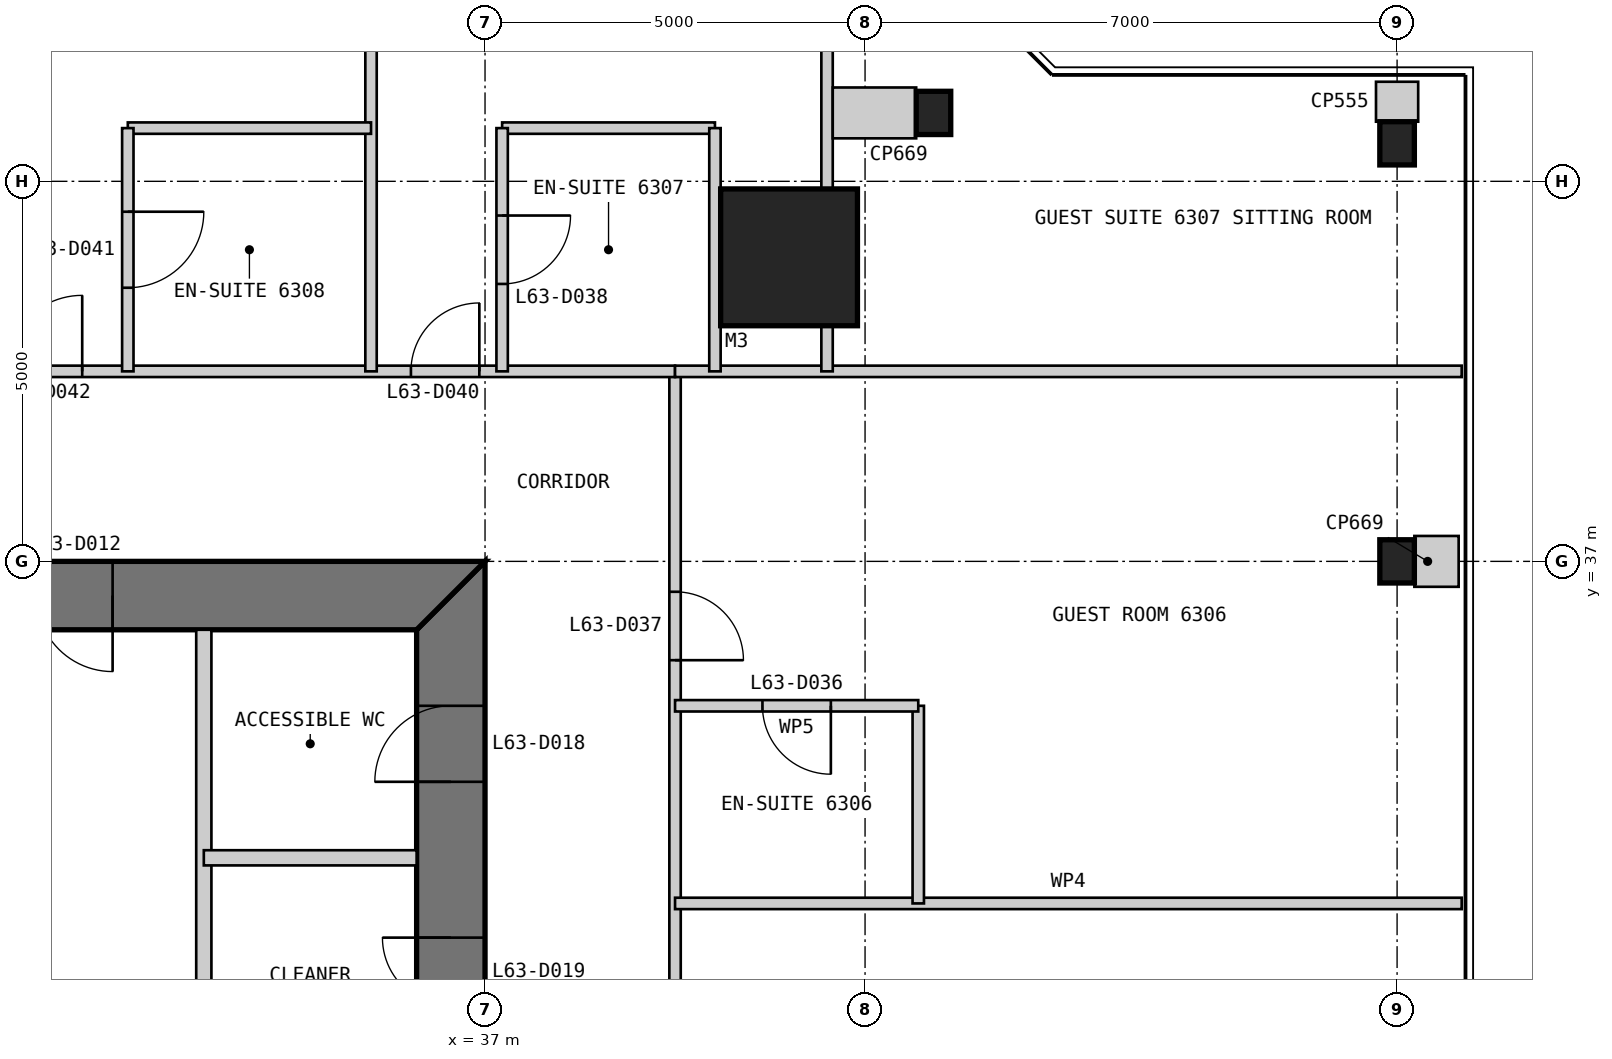
"""IFC4 building model, lengths in metres.
Left out: names, types, materials, properties, quantities, classifications, styles, units other than length and angle.
Written with IfcOpenShell. Run it as: python <this file> out.ifc"""

import sys

from ifc_helpers import new_model, si_unit, direction, frame, frame_2d, origin, origin_2d, place, context, subcontext, project, spatial, polyline, rectangle, i_section, outline, extrude, element, fill, save


model = new_model("IFC4")
c1 = context("Model", 3, precision=1e-05, world=origin(), true_north=direction((0.0, 1.0)))
c2 = subcontext(c1, "Body", "Model", "MODEL_VIEW")
j1 = project(units=[si_unit("LENGTHUNIT", "METRE"), si_unit("PLANEANGLEUNIT", "RADIAN")], contexts=[c1])
p1 = place(None, origin())
s1 = spatial("IfcSite", under=j1, at=p1, CompositionType="ELEMENT")
p2 = place(p1, origin())
s2 = spatial("IfcBuilding", under=s1, at=p2, CompositionType="ELEMENT")
p3 = place(p2, frame((0.0, 0.0, 266.2)))
s3 = spatial("IfcBuildingStorey", under=s2, at=p3, CompositionType="ELEMENT", Elevation=266.2)
p4 = place(p3, frame((41.0, 41.0, 0.0), z_axis=(0.0, 0.0, 1.0), x_axis=(1.0, 0.0, 0.0)))
e1 = element("IfcColumn", 1, at=p4, inside=s3, PredefinedType="COLUMN", context=c2, shape_type="SweptSolid", body=[
    extrude(rectangle(XDim=1.8, YDim=1.8, at=origin_2d()), origin(), (0.0, 0.0, 1.0), 3.4),
])
for number, where, z_axis, x_axis in (
    (2, (49.0, 37.0, 0.0), (0.0, 0.0, 1.0), (1.0, 0.0, 0.0)),
    (3, (49.0, 42.5, 0.0), (0.0, 0.0, 1.0), (1.0, 0.0, 0.0)),
    (4, (42.9, 42.9, 0.0), (0.0, 0.0, 1.0), (1.0, 0.0, 0.0)),
):
    element("IfcColumn", number, at=place(p3, frame(where, z_axis=z_axis, x_axis=x_axis)), inside=s3, PredefinedType="COLUMN", context=c2, shape_type="SweptSolid", body=[
        extrude(i_section(OverallWidth=0.455, OverallDepth=0.569, WebThickness=0.078, FlangeThickness=0.125, at=origin_2d()), origin(), (0.0, 0.0, 1.0), 3.4),
    ])
p5 = place(p3, frame((36.55, 13.9, 0.0), z_axis=(0.0, 0.0, 1.0), x_axis=(0.0, 1.0, 0.0)))
e5 = element("IfcWall", 5, at=p5, inside=s3, PredefinedType="SHEAR", context=c2, shape_type="SweptSolid", body=[
    extrude(outline(polyline([(-0.9, -0.45), (23.1, -0.45), (22.2, 0.45), (0.0, 0.45), (-0.9, -0.45)])), origin(), (0.0, 0.0, 1.0), 3.4),
])
p6 = place(p5, frame((20.2, 0.0, 0.0)))
e6 = element("IfcOpeningElement", 6, at=p6, cuts=e5, PredefinedType="OPENING", context=c2, shape_type="SweptSolid", body=[
    extrude(rectangle(XDim=1.0, YDim=2.2, at=frame_2d((0.5, 1.1))), frame((0.0, 0.46, 0.0), z_axis=(0.0, -1.0, 0.0), x_axis=(1.0, 0.0, 0.0)), (0.0, 0.0, 1.0), 0.92),
])
p7 = place(p5, frame((17.25, 0.0, 0.0)))
e7 = element("IfcOpeningElement", 7, at=p7, cuts=e5, PredefinedType="OPENING", context=c2, shape_type="SweptSolid", body=[
    extrude(rectangle(XDim=0.9, YDim=2.2, at=frame_2d((0.45, 1.1))), frame((0.0, 0.46, 0.0), z_axis=(0.0, -1.0, 0.0), x_axis=(1.0, 0.0, 0.0)), (0.0, 0.0, 1.0), 0.92),
])
p8 = place(p3, frame((37.0, 36.55, 0.0), z_axis=(0.0, 0.0, 1.0), x_axis=(-1.0, 0.0, 0.0)))
e8 = element("IfcWall", 8, at=p8, inside=s3, PredefinedType="SHEAR", context=c2, shape_type="SweptSolid", body=[
    extrude(outline(polyline([(0.0, -0.45), (24.0, -0.45), (23.1, 0.45), (0.9, 0.45), (0.0, -0.45)])), origin(), (0.0, 0.0, 1.0), 3.4),
])
p9 = place(p8, frame((4.9, 0.0, 0.0)))
e9 = element("IfcOpeningElement", 9, at=p9, cuts=e8, PredefinedType="OPENING", context=c2, shape_type="SweptSolid", body=[
    extrude(rectangle(XDim=1.0, YDim=2.2, at=frame_2d((0.5, 1.1))), frame((0.0, 0.46, 0.0), z_axis=(0.0, -1.0, 0.0), x_axis=(1.0, 0.0, 0.0)), (0.0, 0.0, 1.0), 0.92),
])
p10 = place(p8, frame((8.9, 0.0, 0.0)))
e10 = element("IfcOpeningElement", 10, at=p10, cuts=e8, PredefinedType="OPENING", context=c2, shape_type="SweptSolid", body=[
    extrude(rectangle(XDim=1.1, YDim=2.2, at=frame_2d((0.55, 1.1))), frame((0.0, 0.46, 0.0), z_axis=(0.0, -1.0, 0.0), x_axis=(1.0, 0.0, 0.0)), (0.0, 0.0, 1.0), 0.92),
])
p11 = place(p8, frame((15.05, 0.0, 0.0)))
e11 = element("IfcOpeningElement", 11, at=p11, cuts=e8, PredefinedType="OPENING", context=c2, shape_type="SweptSolid", body=[
    extrude(rectangle(XDim=0.9, YDim=2.2, at=frame_2d((0.45, 1.1))), frame((0.0, 0.46, 0.0), z_axis=(0.0, -1.0, 0.0), x_axis=(1.0, 0.0, 0.0)), (0.0, 0.0, 1.0), 0.92),
])
p12 = place(p8, frame((17.9, 0.0, 0.0)))
e12 = element("IfcOpeningElement", 12, at=p12, cuts=e8, PredefinedType="OPENING", context=c2, shape_type="SweptSolid", body=[
    extrude(rectangle(XDim=1.0, YDim=2.2, at=frame_2d((0.5, 1.1))), frame((0.0, 0.46, 0.0), z_axis=(0.0, -1.0, 0.0), x_axis=(1.0, 0.0, 0.0)), (0.0, 0.0, 1.0), 0.92),
])
p13 = place(p8, frame((21.4, 0.0, 0.0)))
e13 = element("IfcOpeningElement", 13, at=p13, cuts=e8, PredefinedType="OPENING", context=c2, shape_type="SweptSolid", body=[
    extrude(rectangle(XDim=1.0, YDim=2.2, at=frame_2d((0.5, 1.1))), frame((0.0, 0.46, 0.0), z_axis=(0.0, -1.0, 0.0), x_axis=(1.0, 0.0, 0.0)), (0.0, 0.0, 1.0), 0.92),
])
p14 = place(p3, frame((33.3, 36.1, 0.0), z_axis=(0.0, 0.0, 1.0), x_axis=(0.0, -1.0, 0.0)))
e14 = element("IfcWall", 14, at=p14, inside=s3, PredefinedType="PARTITIONING", context=c2, shape_type="SweptSolid", body=[
    extrude(rectangle(XDim=16.1, YDim=0.2, at=frame_2d((8.05, 0.0))), origin(), (0.0, 0.0, 1.0), 3.2),
])
p15 = place(p14, frame((7.217, 0.0, 0.0)))
e15 = element("IfcOpeningElement", 15, at=p15, cuts=e14, PredefinedType="OPENING", context=c2, shape_type="SweptSolid", body=[
    extrude(rectangle(XDim=1.1, YDim=2.2, at=frame_2d((0.55, 1.1))), frame((0.0, 0.11, 0.0), z_axis=(0.0, -1.0, 0.0), x_axis=(1.0, 0.0, 0.0)), (0.0, 0.0, 1.0), 0.22),
])
p16 = place(p14, frame((10.55, 0.0, 0.0)))
e16 = element("IfcOpeningElement", 16, at=p16, cuts=e14, PredefinedType="OPENING", context=c2, shape_type="SweptSolid", body=[
    extrude(rectangle(XDim=1.1, YDim=2.2, at=frame_2d((0.55, 1.1))), frame((0.0, 0.11, 0.0), z_axis=(0.0, -1.0, 0.0), x_axis=(1.0, 0.0, 0.0)), (0.0, 0.0, 1.0), 0.22),
])
p17 = place(p14, frame((13.883, 0.0, 0.0)))
e17 = element("IfcOpeningElement", 17, at=p17, cuts=e14, PredefinedType="OPENING", context=c2, shape_type="SweptSolid", body=[
    extrude(rectangle(XDim=1.1, YDim=2.2, at=frame_2d((0.55, 1.1))), frame((0.0, 0.11, 0.0), z_axis=(0.0, -1.0, 0.0), x_axis=(1.0, 0.0, 0.0)), (0.0, 0.0, 1.0), 0.22),
])
p18 = place(p3, frame((36.1, 33.1, 0.0), z_axis=(0.0, 0.0, 1.0), x_axis=(-1.0, 0.0, 0.0)))
e18 = element("IfcWall", 18, at=p18, inside=s3, PredefinedType="PARTITIONING", context=c2, shape_type="SweptSolid", body=[
    extrude(rectangle(XDim=2.8, YDim=0.2, at=frame_2d((1.4, 0.0))), origin(), (0.0, 0.0, 1.0), 3.2),
])
p19 = place(p3, frame((39.5, 10.5, 0.0), z_axis=(0.0, 0.0, 1.0), x_axis=(0.0, 1.0, 0.0)))
e19 = element("IfcWall", 19, at=p19, inside=s3, PredefinedType="PARTITIONING", context=c2, shape_type="SweptSolid", body=[
    extrude(rectangle(XDim=29.0, YDim=0.15, at=frame_2d((14.5, 0.0))), origin(), (0.0, 0.0, 1.0), 3.25),
])
p20 = place(p19, frame((2.4, 0.0, 0.0)))
e20 = element("IfcOpeningElement", 20, at=p20, cuts=e19, PredefinedType="OPENING", context=c2, shape_type="SweptSolid", body=[
    extrude(rectangle(XDim=0.9, YDim=2.1, at=frame_2d((0.45, 1.05))), frame((0.0, 0.085, 0.0), z_axis=(0.0, -1.0, 0.0), x_axis=(1.0, 0.0, 0.0)), (0.0, 0.0, 1.0), 0.17),
])
p21 = place(p19, frame((7.2, 0.0, 0.0)))
e21 = element("IfcOpeningElement", 21, at=p21, cuts=e19, PredefinedType="OPENING", context=c2, shape_type="SweptSolid", body=[
    extrude(rectangle(XDim=0.9, YDim=2.1, at=frame_2d((0.45, 1.05))), frame((0.0, 0.085, 0.0), z_axis=(0.0, -1.0, 0.0), x_axis=(1.0, 0.0, 0.0)), (0.0, 0.0, 1.0), 0.17),
])
p22 = place(p19, frame((13.6, 0.0, 0.0)))
e22 = element("IfcOpeningElement", 22, at=p22, cuts=e19, PredefinedType="OPENING", context=c2, shape_type="SweptSolid", body=[
    extrude(rectangle(XDim=0.9, YDim=2.1, at=frame_2d((0.45, 1.05))), frame((0.0, 0.085, 0.0), z_axis=(0.0, -1.0, 0.0), x_axis=(1.0, 0.0, 0.0)), (0.0, 0.0, 1.0), 0.17),
])
p23 = place(p19, frame((25.2, 0.0, 0.0)))
e23 = element("IfcOpeningElement", 23, at=p23, cuts=e19, PredefinedType="OPENING", context=c2, shape_type="SweptSolid", body=[
    extrude(rectangle(XDim=0.9, YDim=2.1, at=frame_2d((0.45, 1.05))), frame((0.0, 0.085, 0.0), z_axis=(0.0, -1.0, 0.0), x_axis=(1.0, 0.0, 0.0)), (0.0, 0.0, 1.0), 0.17),
])
p24 = place(p3, frame((49.85, 32.5, 0.0), z_axis=(0.0, 0.0, 1.0), x_axis=(-1.0, 0.0, 0.0)))
e24 = element("IfcWall", 24, at=p24, inside=s3, PredefinedType="PARTITIONING", context=c2, shape_type="SweptSolid", body=[
    extrude(rectangle(XDim=10.35, YDim=0.15, at=frame_2d((5.175, 0.0))), origin(), (0.0, 0.0, 1.0), 3.25),
])
p25 = place(p3, frame((42.7, 32.5, 0.0), z_axis=(0.0, 0.0, 1.0), x_axis=(0.0, 1.0, 0.0)))
e25 = element("IfcWall", 25, at=p25, inside=s3, PredefinedType="PARTITIONING", context=c2, shape_type="SweptSolid", body=[
    extrude(rectangle(XDim=2.6, YDim=0.15, at=frame_2d((1.3, 0.0))), origin(), (0.0, 0.0, 1.0), 3.25),
])
p26 = place(p3, frame((42.7, 35.1, 0.0), z_axis=(0.0, 0.0, 1.0), x_axis=(-1.0, 0.0, 0.0)))
e26 = element("IfcWall", 26, at=p26, inside=s3, PredefinedType="PARTITIONING", context=c2, shape_type="SweptSolid", body=[
    extrude(rectangle(XDim=3.2, YDim=0.15, at=frame_2d((1.6, 0.0))), origin(), (0.0, 0.0, 1.0), 3.25),
])
p27 = place(p26, frame((1.15, 0.0, 0.0)))
e27 = element("IfcOpeningElement", 27, at=p27, cuts=e26, PredefinedType="OPENING", context=c2, shape_type="SweptSolid", body=[
    extrude(rectangle(XDim=0.9, YDim=2.1, at=frame_2d((0.45, 1.05))), frame((0.0, 0.085, 0.0), z_axis=(0.0, -1.0, 0.0), x_axis=(1.0, 0.0, 0.0)), (0.0, 0.0, 1.0), 0.17),
])
p28 = place(p3, frame((39.5, 39.5, 0.0), z_axis=(0.0, 0.0, 1.0), x_axis=(-1.0, 0.0, 0.0)))
e28 = element("IfcWall", 28, at=p28, inside=s3, PredefinedType="PARTITIONING", context=c2, shape_type="SweptSolid", body=[
    extrude(rectangle(XDim=29.0, YDim=0.15, at=frame_2d((14.5, 0.0))), origin(), (0.0, 0.0, 1.0), 3.25),
])
p29 = place(p28, frame((2.575, 0.0, 0.0)))
e29 = element("IfcOpeningElement", 29, at=p29, cuts=e28, PredefinedType="OPENING", context=c2, shape_type="SweptSolid", body=[
    extrude(rectangle(XDim=0.9, YDim=2.1, at=frame_2d((0.45, 1.05))), frame((0.0, 0.085, 0.0), z_axis=(0.0, -1.0, 0.0), x_axis=(1.0, 0.0, 0.0)), (0.0, 0.0, 1.0), 0.17),
])
p30 = place(p28, frame((7.8, 0.0, 0.0)))
e30 = element("IfcOpeningElement", 30, at=p30, cuts=e28, PredefinedType="OPENING", context=c2, shape_type="SweptSolid", body=[
    extrude(rectangle(XDim=1.0, YDim=2.1, at=frame_2d((0.5, 1.05))), frame((0.0, 0.085, 0.0), z_axis=(0.0, -1.0, 0.0), x_axis=(1.0, 0.0, 0.0)), (0.0, 0.0, 1.0), 0.17),
])
p31 = place(p28, frame((13.6, 0.0, 0.0)))
e31 = element("IfcOpeningElement", 31, at=p31, cuts=e28, PredefinedType="OPENING", context=c2, shape_type="SweptSolid", body=[
    extrude(rectangle(XDim=0.9, YDim=2.1, at=frame_2d((0.45, 1.05))), frame((0.0, 0.085, 0.0), z_axis=(0.0, -1.0, 0.0), x_axis=(1.0, 0.0, 0.0)), (0.0, 0.0, 1.0), 0.17),
])
p32 = place(p28, frame((25.2, 0.0, 0.0)))
e32 = element("IfcOpeningElement", 32, at=p32, cuts=e28, PredefinedType="OPENING", context=c2, shape_type="SweptSolid", body=[
    extrude(rectangle(XDim=0.9, YDim=2.1, at=frame_2d((0.45, 1.05))), frame((0.0, 0.085, 0.0), z_axis=(0.0, -1.0, 0.0), x_axis=(1.0, 0.0, 0.0)), (0.0, 0.0, 1.0), 0.17),
])
p33 = place(p3, frame((49.85, 39.5, 0.0), z_axis=(0.0, 0.0, 1.0), x_axis=(-1.0, 0.0, 0.0)))
e33 = element("IfcWall", 33, at=p33, inside=s3, PredefinedType="PARTITIONING", context=c2, shape_type="SweptSolid", body=[
    extrude(rectangle(XDim=10.35, YDim=0.15, at=frame_2d((5.175, 0.0))), origin(), (0.0, 0.0, 1.0), 3.25),
])
p34 = place(p3, frame((40.025, 42.7, 0.0), z_axis=(0.0, 0.0, 1.0), x_axis=(-1.0, 0.0, 0.0)))
e34 = element("IfcWall", 34, at=p34, inside=s3, PredefinedType="PARTITIONING", context=c2, shape_type="SweptSolid", body=[
    extrude(rectangle(XDim=2.8, YDim=0.15, at=frame_2d((1.4, 0.0))), origin(), (0.0, 0.0, 1.0), 3.25),
])
p35 = place(p3, frame((37.225, 42.7, 0.0), z_axis=(0.0, 0.0, 1.0), x_axis=(0.0, -1.0, 0.0)))
e35 = element("IfcWall", 35, at=p35, inside=s3, PredefinedType="PARTITIONING", context=c2, shape_type="SweptSolid", body=[
    extrude(rectangle(XDim=3.2, YDim=0.15, at=frame_2d((1.6, 0.0))), origin(), (0.0, 0.0, 1.0), 3.25),
])
p36 = place(p35, frame((1.15, 0.0, 0.0)))
e36 = element("IfcOpeningElement", 36, at=p36, cuts=e35, PredefinedType="OPENING", context=c2, shape_type="SweptSolid", body=[
    extrude(rectangle(XDim=0.9, YDim=2.1, at=frame_2d((0.45, 1.05))), frame((0.0, 0.085, 0.0), z_axis=(0.0, -1.0, 0.0), x_axis=(1.0, 0.0, 0.0)), (0.0, 0.0, 1.0), 0.17),
])
p37 = place(p3, frame((40.025, 42.7, 0.0), z_axis=(0.0, 0.0, 1.0), x_axis=(0.0, -1.0, 0.0)))
e37 = element("IfcWall", 37, at=p37, inside=s3, PredefinedType="PARTITIONING", context=c2, shape_type="SweptSolid", body=[
    extrude(rectangle(XDim=3.2, YDim=0.15, at=frame_2d((1.6, 0.0))), origin(), (0.0, 0.0, 1.0), 3.25),
])
p38 = place(p3, frame((41.5, 49.85, 0.0), z_axis=(0.0, 0.0, 1.0), x_axis=(0.0, -1.0, 0.0)))
e38 = element("IfcWall", 38, at=p38, inside=s3, PredefinedType="PARTITIONING", context=c2, shape_type="SweptSolid", body=[
    extrude(rectangle(XDim=10.35, YDim=0.15, at=frame_2d((5.175, 0.0))), origin(), (0.0, 0.0, 1.0), 3.25),
])
p39 = place(p38, frame((5.0, 0.0, 0.0)))
e39 = element("IfcOpeningElement", 39, at=p39, cuts=e38, PredefinedType="OPENING", context=c2, shape_type="SweptSolid", body=[
    extrude(rectangle(XDim=0.9, YDim=2.1, at=frame_2d((0.45, 1.05))), frame((0.0, 0.085, 0.0), z_axis=(0.0, -1.0, 0.0), x_axis=(1.0, 0.0, 0.0)), (0.0, 0.0, 1.0), 0.17),
])
p40 = place(p3, frame((35.5, 49.85, 0.0), z_axis=(0.0, 0.0, 1.0), x_axis=(0.0, -1.0, 0.0)))
e40 = element("IfcWall", 40, at=p40, inside=s3, PredefinedType="PARTITIONING", context=c2, shape_type="SweptSolid", body=[
    extrude(rectangle(XDim=10.35, YDim=0.15, at=frame_2d((5.175, 0.0))), origin(), (0.0, 0.0, 1.0), 3.25),
])
p41 = place(p3, frame((35.5, 42.7, 0.0), z_axis=(0.0, 0.0, 1.0), x_axis=(-1.0, 0.0, 0.0)))
e41 = element("IfcWall", 41, at=p41, inside=s3, PredefinedType="PARTITIONING", context=c2, shape_type="SweptSolid", body=[
    extrude(rectangle(XDim=3.2, YDim=0.15, at=frame_2d((1.6, 0.0))), origin(), (0.0, 0.0, 1.0), 3.25),
])
p42 = place(p3, frame((32.3, 42.7, 0.0), z_axis=(0.0, 0.0, 1.0), x_axis=(0.0, -1.0, 0.0)))
e42 = element("IfcWall", 42, at=p42, inside=s3, PredefinedType="PARTITIONING", context=c2, shape_type="SweptSolid", body=[
    extrude(rectangle(XDim=3.2, YDim=0.15, at=frame_2d((1.6, 0.0))), origin(), (0.0, 0.0, 1.0), 3.25),
])
p43 = place(p42, frame((1.1, 0.0, 0.0)))
e43 = element("IfcOpeningElement", 43, at=p43, cuts=e42, PredefinedType="OPENING", context=c2, shape_type="SweptSolid", body=[
    extrude(rectangle(XDim=1.0, YDim=2.1, at=frame_2d((0.5, 1.05))), frame((0.0, 0.085, 0.0), z_axis=(0.0, -1.0, 0.0), x_axis=(1.0, 0.0, 0.0)), (0.0, 0.0, 1.0), 0.17),
])
p44 = place(p3, frame((49.81, 37.0, 0.0), z_axis=(0.0, 0.0, 1.0), x_axis=(-1.0, 0.0, 0.0)))
e44 = element("IfcWall", 44, at=p44, inside=s3, PredefinedType="PARTITIONING", context=c2, shape_type="SweptSolid", body=[
    extrude(rectangle(XDim=0.583, YDim=0.669, at=frame_2d((0.292, 0.0))), origin(), (0.0, 0.0, 1.0), 3.25),
])
p45 = place(p3, frame((49.0, 43.31, 0.0), z_axis=(0.0, 0.0, 1.0), x_axis=(0.0, -1.0, 0.0)))
e45 = element("IfcWall", 45, at=p45, inside=s3, PredefinedType="PARTITIONING", context=c2, shape_type="SweptSolid", body=[
    extrude(rectangle(XDim=0.526, YDim=0.555, at=frame_2d((0.263, 0.0))), origin(), (0.0, 0.0, 1.0), 3.25),
])
p46 = place(p3, frame((41.575, 42.9, 0.0), z_axis=(0.0, 0.0, 1.0), x_axis=(1.0, 0.0, 0.0)))
e46 = element("IfcWall", 46, at=p46, inside=s3, PredefinedType="PARTITIONING", context=c2, shape_type="SweptSolid", body=[
    extrude(rectangle(XDim=1.098, YDim=0.669, at=frame_2d((0.549, 0.0))), origin(), (0.0, 0.0, 1.0), 3.25),
])
p47 = place(p9, origin())
e47 = element("IfcDoor", 47, at=p47, inside=s3, OperationType="SINGLE_SWING_LEFT", PredefinedType="DOOR", context=c2, shape_type="SweptSolid", body=[
    extrude(rectangle(XDim=1.0, YDim=2.2, at=frame_2d((0.5, 1.1))), frame((0.0, 0.025, 0.0), z_axis=(0.0, -1.0, 0.0), x_axis=(1.0, 0.0, 0.0)), (0.0, 0.0, 1.0), 0.05),
    extrude(outline(polyline([(0.0, 0.0), (0.04, 0.0), (0.04, 2.16), (0.96, 2.16), (0.96, 0.0), (1.0, 0.0), (1.0, 2.2), (0.0, 2.2), (0.0, 0.0)])), frame((0.0, 0.3, 0.0), z_axis=(0.0, -1.0, 0.0), x_axis=(1.0, 0.0, 0.0)), (0.0, 0.0, 1.0), 0.6),
])
fill(e9, e47)
p48 = place(p6, origin())
e48 = element("IfcDoor", 48, at=p48, inside=s3, OperationType="SINGLE_SWING_LEFT", PredefinedType="DOOR", context=c2, shape_type="SweptSolid", body=[
    extrude(rectangle(XDim=1.0, YDim=2.2, at=frame_2d((0.5, 1.1))), frame((0.0, 0.025, 0.0), z_axis=(0.0, -1.0, 0.0), x_axis=(1.0, 0.0, 0.0)), (0.0, 0.0, 1.0), 0.05),
    extrude(outline(polyline([(0.0, 0.0), (0.04, 0.0), (0.04, 2.16), (0.96, 2.16), (0.96, 0.0), (1.0, 0.0), (1.0, 2.2), (0.0, 2.2), (0.0, 0.0)])), frame((0.0, 0.3, 0.0), z_axis=(0.0, -1.0, 0.0), x_axis=(1.0, 0.0, 0.0)), (0.0, 0.0, 1.0), 0.6),
])
fill(e6, e48)
p49 = place(p7, origin())
e49 = element("IfcDoor", 49, at=p49, inside=s3, OperationType="SINGLE_SWING_RIGHT", PredefinedType="DOOR", context=c2, shape_type="SweptSolid", body=[
    extrude(rectangle(XDim=0.9, YDim=2.2, at=frame_2d((0.45, 1.1))), frame((0.0, 0.025, 0.0), z_axis=(0.0, -1.0, 0.0), x_axis=(1.0, 0.0, 0.0)), (0.0, 0.0, 1.0), 0.05),
    extrude(outline(polyline([(0.0, 0.0), (0.04, 0.0), (0.04, 2.16), (0.86, 2.16), (0.86, 0.0), (0.9, 0.0), (0.9, 2.2), (0.0, 2.2), (0.0, 0.0)])), frame((0.0, 0.3, 0.0), z_axis=(0.0, -1.0, 0.0), x_axis=(1.0, 0.0, 0.0)), (0.0, 0.0, 1.0), 0.6),
])
fill(e7, e49)
p50 = place(p27, origin())
e50 = element("IfcDoor", 50, at=p50, inside=s3, OperationType="SINGLE_SWING_LEFT", PredefinedType="DOOR", context=c2, shape_type="SweptSolid", body=[
    extrude(rectangle(XDim=0.9, YDim=2.1, at=frame_2d((0.45, 1.05))), frame((0.0, 0.025, 0.0), z_axis=(0.0, -1.0, 0.0), x_axis=(1.0, 0.0, 0.0)), (0.0, 0.0, 1.0), 0.05),
])
fill(e27, e50)
p51 = place(p23, frame((0.9, 0.0, 0.0), z_axis=(0.0, 0.0, 1.0), x_axis=(-1.0, 0.0, 0.0)))
e51 = element("IfcDoor", 51, at=p51, inside=s3, OperationType="SINGLE_SWING_RIGHT", PredefinedType="DOOR", context=c2, shape_type="SweptSolid", body=[
    extrude(rectangle(XDim=0.9, YDim=2.1, at=frame_2d((0.45, 1.05))), frame((0.0, 0.025, 0.0), z_axis=(0.0, -1.0, 0.0), x_axis=(1.0, 0.0, 0.0)), (0.0, 0.0, 1.0), 0.05),
])
fill(e23, e51)
p52 = place(p36, origin())
e52 = element("IfcDoor", 52, at=p52, inside=s3, OperationType="SINGLE_SWING_LEFT", PredefinedType="DOOR", context=c2, shape_type="SweptSolid", body=[
    extrude(rectangle(XDim=0.9, YDim=2.1, at=frame_2d((0.45, 1.05))), frame((0.0, 0.025, 0.0), z_axis=(0.0, -1.0, 0.0), x_axis=(1.0, 0.0, 0.0)), (0.0, 0.0, 1.0), 0.05),
])
fill(e36, e52)
p53 = place(p29, frame((0.9, 0.0, 0.0), z_axis=(0.0, 0.0, 1.0), x_axis=(-1.0, 0.0, 0.0)))
e53 = element("IfcDoor", 53, at=p53, inside=s3, OperationType="SINGLE_SWING_RIGHT", PredefinedType="DOOR", context=c2, shape_type="SweptSolid", body=[
    extrude(rectangle(XDim=0.9, YDim=2.1, at=frame_2d((0.45, 1.05))), frame((0.0, 0.025, 0.0), z_axis=(0.0, -1.0, 0.0), x_axis=(1.0, 0.0, 0.0)), (0.0, 0.0, 1.0), 0.05),
])
fill(e29, e53)
p54 = place(p43, origin())
e54 = element("IfcDoor", 54, at=p54, inside=s3, OperationType="SINGLE_SWING_LEFT", PredefinedType="DOOR", context=c2, shape_type="SweptSolid", body=[
    extrude(rectangle(XDim=1.0, YDim=2.1, at=frame_2d((0.5, 1.05))), frame((0.0, 0.025, 0.0), z_axis=(0.0, -1.0, 0.0), x_axis=(1.0, 0.0, 0.0)), (0.0, 0.0, 1.0), 0.05),
])
fill(e43, e54)
p55 = place(p30, frame((1.0, 0.0, 0.0), z_axis=(0.0, 0.0, 1.0), x_axis=(-1.0, 0.0, 0.0)))
e55 = element("IfcDoor", 55, at=p55, inside=s3, OperationType="SINGLE_SWING_RIGHT", PredefinedType="DOOR", context=c2, shape_type="SweptSolid", body=[
    extrude(rectangle(XDim=1.0, YDim=2.1, at=frame_2d((0.5, 1.05))), frame((0.0, 0.025, 0.0), z_axis=(0.0, -1.0, 0.0), x_axis=(1.0, 0.0, 0.0)), (0.0, 0.0, 1.0), 0.05),
])
fill(e30, e55)
save(model, sys.argv[1])
